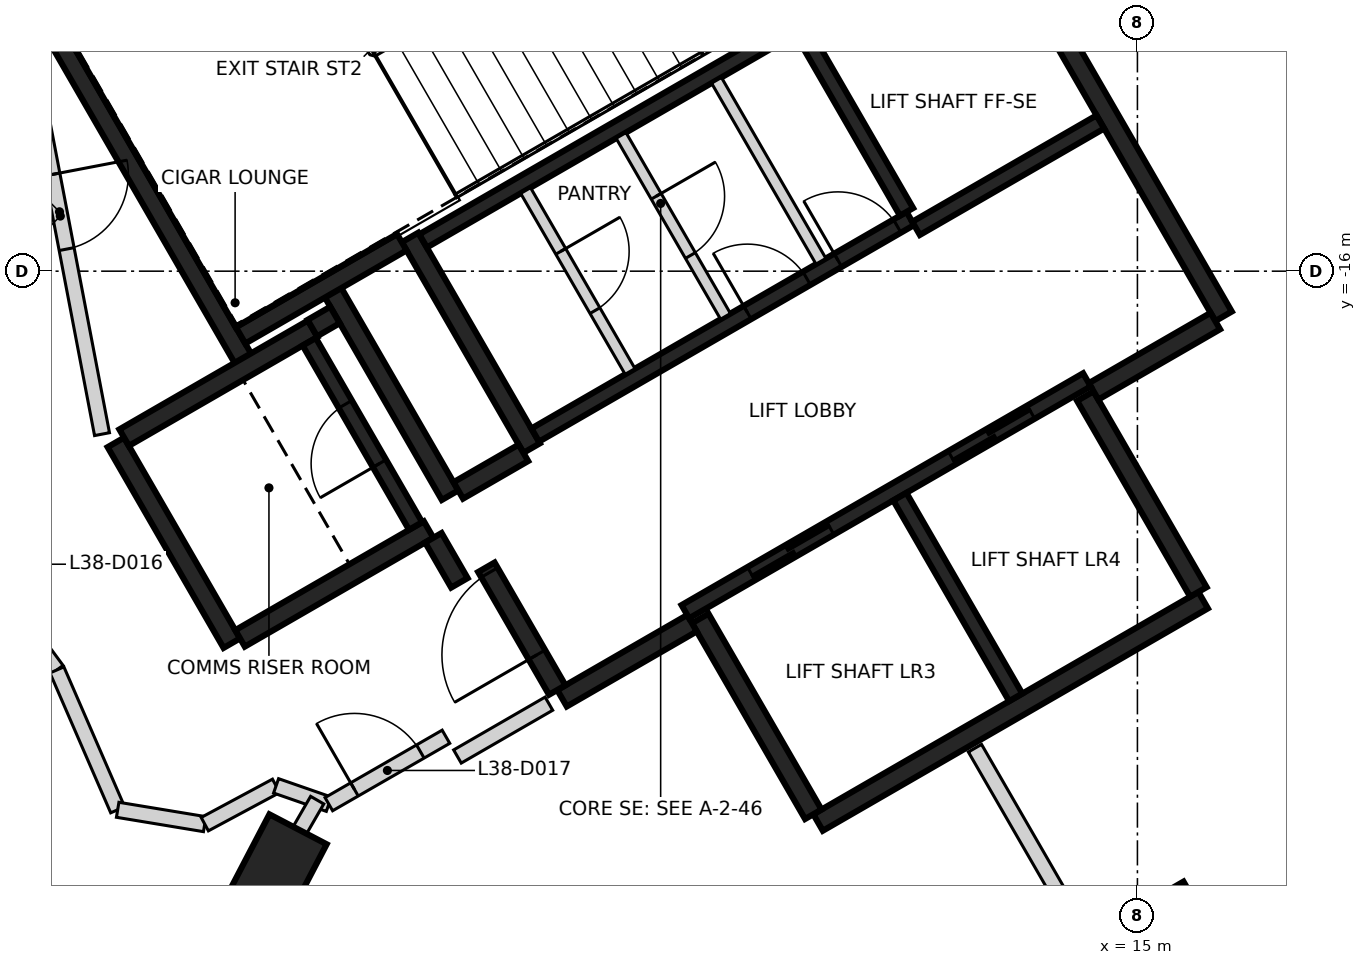
"""IFC4 building model, lengths in metres.
Left out: names, types, materials, properties, quantities, classifications, styles, units other than length and angle.
Written with IfcOpenShell. Run it as: python <this file> out.ifc"""

import sys

from ifc_helpers import new_model, si_unit, direction, frame, frame_2d, origin, origin_2d, place, context, subcontext, project, spatial, rectangle, extrude, element, fill, save


model = new_model("IFC4")
c1 = context("Model", 3, precision=1e-05, world=origin(), true_north=direction((0.0, 1.0)))
c2 = subcontext(c1, "Body", "Model", "MODEL_VIEW")
j1 = project(units=[si_unit("LENGTHUNIT", "METRE"), si_unit("PLANEANGLEUNIT", "RADIAN")], contexts=[c1])
p1 = place(None, origin())
s1 = spatial("IfcSite", under=j1, at=p1, CompositionType="ELEMENT")
p2 = place(p1, origin())
s2 = spatial("IfcBuilding", under=s1, at=p2, CompositionType="ELEMENT")
p3 = place(p2, frame((0.0, 0.0, 154.0)))
s3 = spatial("IfcBuildingStorey", under=s2, at=p3, CompositionType="ELEMENT", Elevation=154.0)
p4 = place(p3, frame((3.667, -23.896, -0.4), z_axis=(0.0, 0.0, 1.0), x_axis=(0.463006774365, 0.886354740999, 0.0)))
e1 = element("IfcColumn", 1, at=p4, inside=s3, PredefinedType="COLUMN", context=c2, shape_type="SweptSolid", body=[
    extrude(rectangle(XDim=1.25, YDim=0.85, at=origin_2d()), origin(), (0.0, 0.0, 1.0), 3.6),
])
p5 = place(p3, frame((15.207, -26.34, -0.4), z_axis=(0.0, 0.0, 1.0), x_axis=(-0.5, 0.866025403784, 0.0)))
e2 = element("IfcColumn", 2, at=p5, inside=s3, PredefinedType="COLUMN", context=c2, shape_type="SweptSolid", body=[
    extrude(rectangle(XDim=3.6, YDim=3.0, at=origin_2d()), origin(), (0.0, 0.0, 1.0), 3.6),
])
p6 = place(p3, frame((13.008, -11.181, 0.0), z_axis=(0.0, 0.0, 1.0), x_axis=(0.500004234368, -0.866022959057, 0.0)))
e3 = element("IfcWall", 3, at=p6, inside=s3, PredefinedType="SHEAR", context=c2, shape_type="SweptSolid", body=[
    extrude(rectangle(XDim=6.25, YDim=0.25, at=frame_2d((3.125, 0.0))), origin(), (0.0, 0.0, 1.0), 3.2),
])
p7 = place(p3, frame((15.865, -20.328, 0.0), z_axis=(0.0, 0.0, 1.0), x_axis=(-0.86602852612, -0.499994591916, 0.0)))
e4 = element("IfcWall", 4, at=p7, inside=s3, PredefinedType="SHEAR", context=c2, shape_type="SweptSolid", body=[
    extrude(rectangle(XDim=5.85, YDim=0.25, at=frame_2d((2.925, 0.0))), origin(), (0.0, 0.0, 1.0), 3.2),
])
p8 = place(p3, frame((3.235, -17.153, 0.0), z_axis=(0.0, 0.0, 1.0), x_axis=(-0.500008851346, 0.866020293397, 0.0)))
e5 = element("IfcWall", 5, at=p8, inside=s3, PredefinedType="SHEAR", context=c2, shape_type="SweptSolid", body=[
    extrude(rectangle(XDim=5.51, YDim=0.25, at=frame_2d((2.755, 0.0))), origin(), (0.0, 0.0, 1.0), 3.2),
])
p9 = place(p3, frame((7.031, -18.327, 0.0), z_axis=(0.0, 0.0, 1.0), x_axis=(-0.499971222258, 0.866042017984, 0.0)))
e6 = element("IfcWall", 6, at=p9, inside=s3, PredefinedType="SHEAR", context=c2, shape_type="SweptSolid", body=[
    extrude(rectangle(XDim=3.2, YDim=0.25, at=frame_2d((1.6, 0.0))), origin(), (0.0, 0.0, 1.0), 3.2),
])
for number, where, z_axis, x_axis in (
    (7, (14.315, -17.644, 0.0), (0.0, 0.0, 1.0), (0.5, -0.866, 0.0)),
    (8, (10.736, -23.145, 0.0), (0.0, 0.0, 1.0), (-0.5, 0.866, 0.0)),
):
    element("IfcWall", number, at=place(p3, frame(where, z_axis=z_axis, x_axis=x_axis)), inside=s3, PredefinedType="SHEAR", context=c2, shape_type="SweptSolid", body=[
        extrude(rectangle(XDim=2.974, YDim=0.25, at=frame_2d((1.487, 0.0))), origin(), (0.0, 0.0, 1.0), 3.2),
    ])
p10 = place(p3, frame((3.085, -20.894, 0.0), z_axis=(0.0, 0.0, 1.0), x_axis=(-0.499978833458, 0.866037623948, 0.0)))
e9 = element("IfcWall", 9, at=p10, inside=s3, PredefinedType="SHEAR", context=c2, shape_type="SweptSolid", body=[
    extrude(rectangle(XDim=3.05, YDim=0.25, at=frame_2d((1.525, 0.0))), origin(), (0.0, 0.0, 1.0), 3.2),
])
p11 = place(p3, frame((1.669, -18.19, 0.0), z_axis=(0.0, 0.0, 1.0), x_axis=(0.866042235819, 0.499970844928, 0.0)))
e10 = element("IfcWall", 10, at=p11, inside=s3, PredefinedType="SHEAR", context=c2, shape_type="SweptSolid", body=[
    extrude(rectangle(XDim=2.865, YDim=0.25, at=frame_2d((1.432, 0.0))), origin(), (0.0, 0.0, 1.0), 3.2),
])
p12 = place(p3, frame((5.675, -19.399, 0.0), z_axis=(0.0, 0.0, 1.0), x_axis=(-0.866026637627, -0.499997862916, 0.0)))
e11 = element("IfcWall", 11, at=p12, inside=s3, PredefinedType="SHEAR", context=c2, shape_type="SweptSolid", body=[
    extrude(rectangle(XDim=2.865, YDim=0.25, at=frame_2d((1.432, 0.0))), origin(), (0.0, 0.0, 1.0), 3.2),
])
p13 = place(p3, frame((4.414, -16.276, 0.0), z_axis=(0.0, 0.0, 1.0), x_axis=(0.500003324108, -0.866023484601, 0.0)))
e12 = element("IfcWall", 12, at=p13, inside=s3, PredefinedType="SHEAR", context=c2, shape_type="SweptSolid", body=[
    extrude(rectangle(XDim=3.085, YDim=0.25, at=frame_2d((1.542, 0.0))), origin(), (0.0, 0.0, 1.0), 3.2),
])
p14 = place(p3, frame((5.322, -15.619, 0.0), z_axis=(0.0, 0.0, 1.0), x_axis=(-0.866026229868, -0.499998569178, 0.0)))
e13 = element("IfcWall", 13, at=p14, inside=s3, PredefinedType="SHEAR", context=c2, shape_type="SweptSolid", body=[
    extrude(rectangle(XDim=2.449, YDim=0.25, at=frame_2d((1.225, 0.0))), origin(), (0.0, 0.0, 1.0), 3.2),
])
p15 = place(p3, frame((9.14, -20.631, 0.0), z_axis=(0.0, 0.0, 1.0), x_axis=(-0.866043531843, -0.499968599967, 0.0)))
e14 = element("IfcWall", 14, at=p15, inside=s3, PredefinedType="SHEAR", context=c2, shape_type="SweptSolid", body=[
    extrude(rectangle(XDim=1.975, YDim=0.25, at=frame_2d((0.987, 0.0))), origin(), (0.0, 0.0, 1.0), 3.2),
])
p16 = place(p3, frame((16.025, -16.656, 0.0), z_axis=(0.0, 0.0, 1.0), x_axis=(-0.866016279763, -0.500015802937, 0.0)))
e15 = element("IfcWall", 15, at=p16, inside=s3, PredefinedType="SHEAR", context=c2, shape_type="SweptSolid", body=[
    extrude(rectangle(XDim=1.849, YDim=0.25, at=frame_2d((0.925, 0.0))), origin(), (0.0, 0.0, 1.0), 3.2),
])
p17 = place(p3, frame((7.367, -21.51, 0.0), z_axis=(0.0, 0.0, 1.0), x_axis=(-0.499983108224, 0.866035156036, 0.0)))
e16 = element("IfcWall", 16, at=p17, inside=s3, PredefinedType="SHEAR", context=c2, shape_type="SweptSolid", body=[
    extrude(rectangle(XDim=1.865, YDim=0.25, at=frame_2d((0.932, 0.0))), origin(), (0.0, 0.0, 1.0), 3.2),
])
p18 = place(p17, frame((0.535, 0.0, 0.0)))
e17 = element("IfcOpeningElement", 17, at=p18, cuts=e16, PredefinedType="OPENING", context=c2, shape_type="SweptSolid", body=[
    extrude(rectangle(XDim=1.25, YDim=2.1, at=frame_2d((0.625, 1.05))), frame((0.0, 0.135, 0.0), z_axis=(0.0, -1.0, 0.0), x_axis=(1.0, 0.0, 0.0)), (0.0, 0.0, 1.0), 0.27),
])
p19 = place(p3, frame((6.065, -18.885, 0.0), z_axis=(0.0, 0.0, 1.0), x_axis=(0.866017078145, 0.500014420154, 0.0)))
e18 = element("IfcWall", 18, at=p19, inside=s3, PredefinedType="SHEAR", context=c2, shape_type="SweptSolid", body=[
    extrude(rectangle(XDim=0.989, YDim=0.25, at=frame_2d((0.495, 0.0))), origin(), (0.0, 0.0, 1.0), 3.2),
])
p20 = place(p3, frame((6.08, -20.1, 0.0), z_axis=(0.0, 0.0, 1.0), x_axis=(-0.500051773299, 0.865995510393, 0.0)))
e19 = element("IfcWall", 19, at=p20, inside=s3, PredefinedType="SHEAR", context=c2, shape_type="SweptSolid", body=[
    extrude(rectangle(XDim=0.685, YDim=0.25, at=frame_2d((0.342, 0.0))), origin(), (0.0, 0.0, 1.0), 3.2),
])
p21 = place(p3, frame((4.145, -16.749, 0.0), z_axis=(0.0, 0.0, 1.0), x_axis=(0.866185586049, 0.49972245349, 0.0)))
e20 = element("IfcWall", 20, at=p21, inside=s3, PredefinedType="SHEAR", context=c2, shape_type="SweptSolid", body=[
    extrude(rectangle(XDim=0.344, YDim=0.25, at=frame_2d((0.172, 0.0))), origin(), (0.0, 0.0, 1.0), 3.2),
])
p22 = place(p3, frame((9.052, -20.48, 0.0), z_axis=(0.0, 0.0, 1.0), x_axis=(0.866030299012, 0.499991521122, 0.0)))
e21 = element("IfcWall", 21, at=p22, inside=s3, PredefinedType="SHEAR", context=c2, shape_type="SweptSolid", body=[
    extrude(rectangle(XDim=6.1, YDim=0.2, at=frame_2d((3.05, 0.0))), origin(), (0.0, 0.0, 1.0), 3.2),
])
p23 = place(p22, frame((1.0, 0.0, 0.0)))
e22 = element("IfcOpeningElement", 22, at=p23, cuts=e21, PredefinedType="OPENING", context=c2, shape_type="SweptSolid", body=[
    extrude(rectangle(XDim=1.2, YDim=2.1, at=frame_2d((0.6, 1.05))), frame((0.0, 0.11, 0.0), z_axis=(0.0, -1.0, 0.0), x_axis=(1.0, 0.0, 0.0)), (0.0, 0.0, 1.0), 0.22),
])
p24 = place(p22, frame((4.05, 0.0, 0.0)))
e23 = element("IfcOpeningElement", 23, at=p24, cuts=e21, PredefinedType="OPENING", context=c2, shape_type="SweptSolid", body=[
    extrude(rectangle(XDim=1.2, YDim=2.1, at=frame_2d((0.6, 1.05))), frame((0.0, 0.11, 0.0), z_axis=(0.0, -1.0, 0.0), x_axis=(1.0, 0.0, 0.0)), (0.0, 0.0, 1.0), 0.22),
])
p25 = place(p3, frame((10.538, -12.752, 0.0), z_axis=(0.0, 0.0, 1.0), x_axis=(-0.866038630372, -0.499977090179, 0.0)))
e24 = element("IfcWall", 24, at=p25, inside=s3, PredefinedType="SHEAR", context=c2, shape_type="SweptSolid", body=[
    extrude(rectangle(XDim=5.699, YDim=0.2, at=frame_2d((2.85, 0.0))), origin(), (0.0, 0.0, 1.0), 3.2),
])
p26 = place(p3, frame((7.077, -18.156, 0.0), z_axis=(0.0, 0.0, 1.0), x_axis=(0.866038630372, 0.499977090179, 0.0)))
e25 = element("IfcWall", 25, at=p26, inside=s3, PredefinedType="SHEAR", context=c2, shape_type="SweptSolid", body=[
    extrude(rectangle(XDim=5.699, YDim=0.2, at=frame_2d((2.85, 0.0))), origin(), (0.0, 0.0, 1.0), 3.2),
])
p27 = place(p26, frame((3.224, 0.0, 0.0)))
e26 = element("IfcOpeningElement", 26, at=p27, cuts=e25, PredefinedType="OPENING", context=c2, shape_type="SweptSolid", body=[
    extrude(rectangle(XDim=0.9, YDim=2.1, at=frame_2d((0.45, 1.05))), frame((0.0, 0.11, 0.0), z_axis=(0.0, -1.0, 0.0), x_axis=(1.0, 0.0, 0.0)), (0.0, 0.0, 1.0), 0.22),
])
p28 = place(p26, frame((4.599, 0.0, 0.0)))
e27 = element("IfcOpeningElement", 27, at=p28, cuts=e25, PredefinedType="OPENING", context=c2, shape_type="SweptSolid", body=[
    extrude(rectangle(XDim=0.9, YDim=2.1, at=frame_2d((0.45, 1.05))), frame((0.0, 0.11, 0.0), z_axis=(0.0, -1.0, 0.0), x_axis=(1.0, 0.0, 0.0)), (0.0, 0.0, 1.0), 0.22),
])
p29 = place(p3, frame((11.875, -18.967, 0.0), z_axis=(0.0, 0.0, 1.0), x_axis=(0.49998131003, -0.866036194175, 0.0)))
e28 = element("IfcWall", 28, at=p29, inside=s3, PredefinedType="SHEAR", context=c2, shape_type="SweptSolid", body=[
    extrude(rectangle(XDim=3.048, YDim=0.2, at=frame_2d((1.524, 0.0))), origin(), (0.0, 0.0, 1.0), 3.2),
])
p30 = place(p3, frame((5.503, -19.352, 0.0), z_axis=(0.0, 0.0, 1.0), x_axis=(-0.499986818241, 0.866033014143, 0.0)))
e29 = element("IfcWall", 29, at=p30, inside=s3, PredefinedType="SHEAR", context=c2, shape_type="SweptSolid", body=[
    extrude(rectangle(XDim=2.798, YDim=0.2, at=frame_2d((1.399, 0.0))), origin(), (0.0, 0.0, 1.0), 3.2),
])
p31 = place(p30, frame((0.949, 0.0, 0.0)))
e30 = element("IfcOpeningElement", 30, at=p31, cuts=e29, PredefinedType="OPENING", context=c2, shape_type="SweptSolid", body=[
    extrude(rectangle(XDim=0.9, YDim=2.1, at=frame_2d((0.45, 1.05))), frame((0.0, 0.11, 0.0), z_axis=(0.0, -1.0, 0.0), x_axis=(1.0, 0.0, 0.0)), (0.0, 0.0, 1.0), 0.22),
])
p32 = place(p3, frame((11.963, -15.22, 0.0), z_axis=(0.0, 0.0, 1.0), x_axis=(-0.500034990121, 0.866005201286, 0.0)))
e31 = element("IfcWall", 31, at=p32, inside=s3, PredefinedType="SHEAR", context=c2, shape_type="SweptSolid", body=[
    extrude(rectangle(XDim=2.75, YDim=0.2, at=frame_2d((1.375, 0.0))), origin(), (0.0, 0.0, 1.0), 3.2),
])
p33 = place(p3, frame((14.512, -14.037, 0.0), z_axis=(0.0, 0.0, 1.0), x_axis=(-0.866044696403, -0.499966582715, 0.0)))
e32 = element("IfcWall", 32, at=p33, inside=s3, PredefinedType="SHEAR", context=c2, shape_type="SweptSolid", body=[
    extrude(rectangle(XDim=2.799, YDim=0.2, at=frame_2d((1.399, 0.0))), origin(), (0.0, 0.0, 1.0), 3.2),
])
p34 = place(p3, frame((8.207, -14.214, 0.0), z_axis=(0.0, 0.0, 1.0), x_axis=(0.50002746344, -0.86600954718, 0.0)))
e33 = element("IfcWall", 33, at=p34, inside=s3, PredefinedType="PARTITIONING", context=c2, shape_type="SweptSolid", body=[
    extrude(rectangle(XDim=2.748, YDim=0.15, at=frame_2d((1.374, 0.0))), origin(), (0.0, 0.0, 1.0), 3.2),
])
p35 = place(p34, frame((0.924, 0.0, 0.0)))
e34 = element("IfcOpeningElement", 34, at=p35, cuts=e33, PredefinedType="OPENING", context=c2, shape_type="SweptSolid", body=[
    extrude(rectangle(XDim=0.9, YDim=2.1, at=frame_2d((0.45, 1.05))), frame((0.0, 0.085, 0.0), z_axis=(0.0, -1.0, 0.0), x_axis=(1.0, 0.0, 0.0)), (0.0, 0.0, 1.0), 0.17),
])
p36 = place(p3, frame((9.462, -13.489, 0.0), z_axis=(0.0, 0.0, 1.0), x_axis=(0.499988999718, -0.866031754707, 0.0)))
e35 = element("IfcWall", 35, at=p36, inside=s3, PredefinedType="PARTITIONING", context=c2, shape_type="SweptSolid", body=[
    extrude(rectangle(XDim=2.749, YDim=0.15, at=frame_2d((1.374, 0.0))), origin(), (0.0, 0.0, 1.0), 3.2),
])
p37 = place(p3, frame((6.951, -14.939, 0.0), z_axis=(0.0, 0.0, 1.0), x_axis=(0.499988999718, -0.866031754707, 0.0)))
e36 = element("IfcWall", 36, at=p37, inside=s3, PredefinedType="PARTITIONING", context=c2, shape_type="SweptSolid", body=[
    extrude(rectangle(XDim=2.749, YDim=0.15, at=frame_2d((1.374, 0.0))), origin(), (0.0, 0.0, 1.0), 3.2),
])
p38 = place(p37, frame((0.924, 0.0, 0.0)))
e37 = element("IfcOpeningElement", 37, at=p38, cuts=e36, PredefinedType="OPENING", context=c2, shape_type="SweptSolid", body=[
    extrude(rectangle(XDim=0.9, YDim=2.1, at=frame_2d((0.45, 1.05))), frame((0.0, 0.085, 0.0), z_axis=(0.0, -1.0, 0.0), x_axis=(1.0, 0.0, 0.0)), (0.0, 0.0, 1.0), 0.17),
])
p39 = place(p3, frame((-0.858, -19.016, 0.0), z_axis=(0.0, 0.0, 1.0), x_axis=(0.593123867414, -0.805111220829, 0.0)))
e38 = element("IfcWall", 38, at=p39, inside=s3, PredefinedType="PARTITIONING", context=c2, shape_type="SweptSolid", body=[
    extrude(rectangle(XDim=2.77, YDim=0.2, at=frame_2d((1.385, 0.0))), origin(), (0.0, 0.0, 1.0), 3.2),
])
p40 = place(p39, frame((0.542, 0.0, 0.0)))
e39 = element("IfcOpeningElement", 39, at=p40, cuts=e38, PredefinedType="OPENING", context=c2, shape_type="SweptSolid", body=[
    extrude(rectangle(XDim=1.0, YDim=2.1, at=frame_2d((0.5, 1.05))), frame((0.0, 0.11, 0.0), z_axis=(0.0, -1.0, 0.0), x_axis=(1.0, 0.0, 0.0)), (0.0, 0.0, 1.0), 0.22),
])
p41 = place(p3, frame((0.281, -12.406, 0.0), z_axis=(0.0, 0.0, 1.0), x_axis=(0.187814940093, -0.982204433037, 0.0)))
e40 = element("IfcWall", 40, at=p41, inside=s3, PredefinedType="PARTITIONING", context=c2, shape_type="SweptSolid", body=[
    extrude(rectangle(XDim=5.842, YDim=0.2, at=frame_2d((2.921, 0.0))), origin(), (0.0, 0.0, 1.0), 3.2),
])
p42 = place(p41, frame((2.363, 0.0, 0.0)))
e41 = element("IfcOpeningElement", 41, at=p42, cuts=e40, PredefinedType="OPENING", context=c2, shape_type="SweptSolid", body=[
    extrude(rectangle(XDim=1.0, YDim=2.1, at=frame_2d((0.5, 1.05))), frame((0.0, 0.11, 0.0), z_axis=(0.0, -1.0, 0.0), x_axis=(1.0, 0.0, 0.0)), (0.0, 0.0, 1.0), 0.22),
])
p43 = place(p3, frame((0.785, -21.246, 0.0), z_axis=(0.0, 0.0, 1.0), x_axis=(0.398365586627, -0.917226721913, 0.0)))
e42 = element("IfcWall", 42, at=p43, inside=s3, PredefinedType="PARTITIONING", context=c2, shape_type="SweptSolid", body=[
    extrude(rectangle(XDim=2.006, YDim=0.2, at=frame_2d((1.003, 0.0))), origin(), (0.0, 0.0, 1.0), 2.3),
])
p44 = place(p3, frame((1.584, -23.086, 0.0), z_axis=(0.0, 0.0, 1.0), x_axis=(0.986654221629, -0.162829502674, 0.0)))
e43 = element("IfcWall", 43, at=p44, inside=s3, PredefinedType="PARTITIONING", context=c2, shape_type="SweptSolid", body=[
    extrude(rectangle(XDim=1.16, YDim=0.2, at=frame_2d((0.58, 0.0))), origin(), (0.0, 0.0, 1.0), 2.3),
])
p45 = place(p3, frame((2.73, -23.275, 0.0), z_axis=(0.0, 0.0, 1.0), x_axis=(0.880927165636, 0.473251866182, 0.0)))
e44 = element("IfcWall", 44, at=p45, inside=s3, PredefinedType="PARTITIONING", context=c2, shape_type="SweptSolid", body=[
    extrude(rectangle(XDim=1.065, YDim=0.2, at=frame_2d((0.532, 0.0))), origin(), (0.0, 0.0, 1.0), 3.2),
])
p46 = place(p3, frame((3.668, -22.771, 0.0), z_axis=(0.0, 0.0, 1.0), x_axis=(0.944447470761, -0.328662402738, 0.0)))
e45 = element("IfcWall", 45, at=p46, inside=s3, PredefinedType="PARTITIONING", context=c2, shape_type="SweptSolid", body=[
    extrude(rectangle(XDim=0.735, YDim=0.2, at=frame_2d((0.367, 0.0))), origin(), (0.0, 0.0, 1.0), 3.2),
])
p47 = place(p3, frame((4.362, -23.012, 0.0), z_axis=(0.0, 0.0, 1.0), x_axis=(0.866692617793, 0.49884256661, 0.0)))
e46 = element("IfcWall", 46, at=p47, inside=s3, PredefinedType="PARTITIONING", context=c2, shape_type="SweptSolid", body=[
    extrude(rectangle(XDim=1.778, YDim=0.2, at=frame_2d((0.889, 0.0))), origin(), (0.0, 0.0, 1.0), 3.2),
])
p48 = place(p47, frame((0.389, 0.0, 0.0)))
e47 = element("IfcOpeningElement", 47, at=p48, cuts=e46, PredefinedType="OPENING", context=c2, shape_type="SweptSolid", body=[
    extrude(rectangle(XDim=1.0, YDim=2.1, at=frame_2d((0.5, 1.05))), frame((0.0, 0.11, 0.0), z_axis=(0.0, -1.0, 0.0), x_axis=(1.0, 0.0, 0.0)), (0.0, 0.0, 1.0), 0.22),
])
p49 = place(p3, frame((6.054, -22.385, 0.0), z_axis=(0.0, 0.0, 1.0), x_axis=(0.86593101922, 0.500163443238, 0.0)))
e48 = element("IfcWall", 48, at=p49, inside=s3, PredefinedType="PARTITIONING", context=c2, shape_type="SweptSolid", body=[
    extrude(rectangle(XDim=1.39, YDim=0.2, at=frame_2d((0.695, 0.0))), origin(), (0.0, 0.0, 1.0), 3.2),
])
p50 = place(p3, frame((2.439, -26.024, 0.0), z_axis=(0.0, 0.0, 1.0), x_axis=(0.499989137667, 0.866031675065, 0.0)))
e49 = element("IfcWall", 49, at=p50, inside=s3, PredefinedType="PARTITIONING", context=c2, shape_type="SweptSolid", body=[
    extrude(rectangle(XDim=3.54, YDim=0.2, at=frame_2d((1.77, 0.0))), origin(), (0.0, 0.0, 1.0), 3.2),
])
p51 = place(p3, frame((12.863, -22.275, 0.0), z_axis=(0.0, 0.0, 1.0), x_axis=(0.49982784299, -0.866124775868, 0.0)))
e50 = element("IfcWall", 50, at=p51, inside=s3, PredefinedType="PARTITIONING", context=c2, shape_type="SweptSolid", body=[
    extrude(rectangle(XDim=2.741, YDim=0.2, at=frame_2d((1.37, 0.0))), origin(), (0.0, 0.0, 1.0), 3.2),
])
p52 = place(p23, origin())
e51 = element("IfcDoor", 51, at=p52, inside=s3, OperationType="DOUBLE_DOOR_SLIDING", PredefinedType="DOOR", context=c2, shape_type="SweptSolid", body=[
    extrude(rectangle(XDim=1.2, YDim=2.1, at=frame_2d((0.6, 1.05))), frame((0.0, 0.025, 0.0), z_axis=(0.0, -1.0, 0.0), x_axis=(1.0, 0.0, 0.0)), (0.0, 0.0, 1.0), 0.05),
])
fill(e22, e51)
p53 = place(p24, origin())
e52 = element("IfcDoor", 52, at=p53, inside=s3, OperationType="DOUBLE_DOOR_SLIDING", PredefinedType="DOOR", context=c2, shape_type="SweptSolid", body=[
    extrude(rectangle(XDim=1.2, YDim=2.1, at=frame_2d((0.6, 1.05))), frame((0.0, 0.025, 0.0), z_axis=(0.0, -1.0, 0.0), x_axis=(1.0, 0.0, 0.0)), (0.0, 0.0, 1.0), 0.05),
])
fill(e23, e52)
p54 = place(p18, origin())
e53 = element("IfcDoor", 53, at=p54, inside=s3, OperationType="SINGLE_SWING_LEFT", PredefinedType="DOOR", context=c2, shape_type="SweptSolid", body=[
    extrude(rectangle(XDim=1.25, YDim=2.1, at=frame_2d((0.625, 1.05))), frame((0.0, 0.025, 0.0), z_axis=(0.0, -1.0, 0.0), x_axis=(1.0, 0.0, 0.0)), (0.0, 0.0, 1.0), 0.05),
])
fill(e17, e53)
p55 = place(p27, origin())
e54 = element("IfcDoor", 54, at=p55, inside=s3, OperationType="SINGLE_SWING_RIGHT", PredefinedType="DOOR", context=c2, shape_type="SweptSolid", body=[
    extrude(rectangle(XDim=0.9, YDim=2.1, at=frame_2d((0.45, 1.05))), frame((0.0, 0.025, 0.0), z_axis=(0.0, -1.0, 0.0), x_axis=(1.0, 0.0, 0.0)), (0.0, 0.0, 1.0), 0.05),
])
fill(e26, e54)
p56 = place(p28, origin())
e55 = element("IfcDoor", 55, at=p56, inside=s3, OperationType="SINGLE_SWING_LEFT", PredefinedType="DOOR", context=c2, shape_type="SweptSolid", body=[
    extrude(rectangle(XDim=0.9, YDim=2.1, at=frame_2d((0.45, 1.05))), frame((0.0, 0.025, 0.0), z_axis=(0.0, -1.0, 0.0), x_axis=(1.0, 0.0, 0.0)), (0.0, 0.0, 1.0), 0.05),
])
fill(e27, e55)
p57 = place(p31, origin())
e56 = element("IfcDoor", 56, at=p57, inside=s3, OperationType="SINGLE_SWING_RIGHT", PredefinedType="DOOR", context=c2, shape_type="SweptSolid", body=[
    extrude(rectangle(XDim=0.9, YDim=2.1, at=frame_2d((0.45, 1.05))), frame((0.0, 0.025, 0.0), z_axis=(0.0, -1.0, 0.0), x_axis=(1.0, 0.0, 0.0)), (0.0, 0.0, 1.0), 0.05),
])
fill(e30, e56)
p58 = place(p35, origin())
e57 = element("IfcDoor", 57, at=p58, inside=s3, OperationType="SINGLE_SWING_LEFT", PredefinedType="DOOR", context=c2, shape_type="SweptSolid", body=[
    extrude(rectangle(XDim=0.9, YDim=2.1, at=frame_2d((0.45, 1.05))), frame((0.0, 0.025, 0.0), z_axis=(0.0, -1.0, 0.0), x_axis=(1.0, 0.0, 0.0)), (0.0, 0.0, 1.0), 0.05),
])
fill(e34, e57)
p59 = place(p38, origin())
e58 = element("IfcDoor", 58, at=p59, inside=s3, OperationType="SINGLE_SWING_RIGHT", PredefinedType="DOOR", context=c2, shape_type="SweptSolid", body=[
    extrude(rectangle(XDim=0.9, YDim=2.1, at=frame_2d((0.45, 1.05))), frame((0.0, 0.025, 0.0), z_axis=(0.0, -1.0, 0.0), x_axis=(1.0, 0.0, 0.0)), (0.0, 0.0, 1.0), 0.05),
])
fill(e37, e58)
p60 = place(p42, origin())
e59 = element("IfcDoor", 59, at=p60, inside=s3, OperationType="SINGLE_SWING_LEFT", PredefinedType="DOOR", context=c2, shape_type="SweptSolid", body=[
    extrude(rectangle(XDim=1.0, YDim=2.1, at=frame_2d((0.5, 1.05))), frame((0.0, 0.025, 0.0), z_axis=(0.0, -1.0, 0.0), x_axis=(1.0, 0.0, 0.0)), (0.0, 0.0, 1.0), 0.05),
])
fill(e41, e59)
p61 = place(p48, frame((1.0, 0.0, 0.0), z_axis=(0.0, 0.0, 1.0), x_axis=(-1.0, 0.0, 0.0)))
e60 = element("IfcDoor", 60, at=p61, inside=s3, OperationType="SINGLE_SWING_LEFT", PredefinedType="DOOR", context=c2, shape_type="SweptSolid", body=[
    extrude(rectangle(XDim=1.0, YDim=2.1, at=frame_2d((0.5, 1.05))), frame((0.0, 0.025, 0.0), z_axis=(0.0, -1.0, 0.0), x_axis=(1.0, 0.0, 0.0)), (0.0, 0.0, 1.0), 0.05),
])
fill(e47, e60)
save(model, sys.argv[1])
